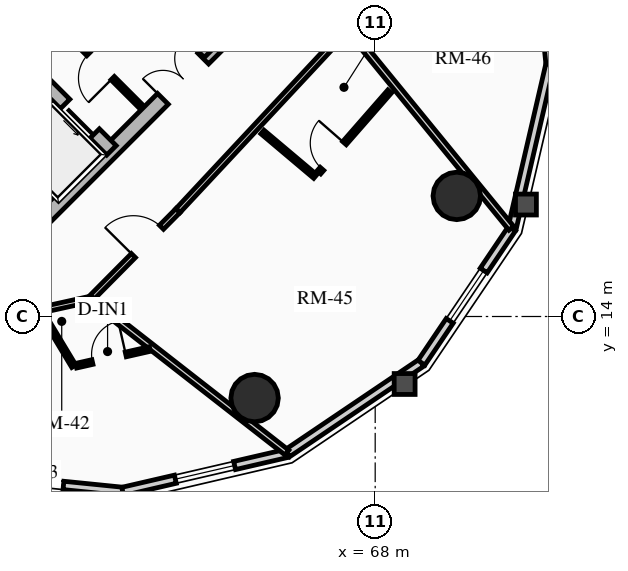
"""IFC4 building model, lengths in metres.
Left out: names, types, materials, properties, quantities, classifications, styles, units other than length and angle.
Written with IfcOpenShell. Run it as: python <this file> out.ifc"""

import sys

from ifc_helpers import new_model, si_unit, direction, frame, frame_2d, origin, origin_2d, place, context, subcontext, project, spatial, rectangle, circle, extrude, source, transform, mapped, element, fill, save


model = new_model("IFC4")
c1 = context("Model", 3, precision=1e-05, world=origin(), true_north=direction((0.0, 1.0)))
c2 = subcontext(c1, "Body", "Model", "MODEL_VIEW")
j1 = project(units=[si_unit("LENGTHUNIT", "METRE"), si_unit("PLANEANGLEUNIT", "RADIAN")], contexts=[c1])
p1 = place(None, origin())
s1 = spatial("IfcSite", under=j1, at=p1, CompositionType="ELEMENT")
p2 = place(p1, origin())
s2 = spatial("IfcBuilding", under=s1, at=p2, CompositionType="ELEMENT")
p3 = place(p2, frame((0.0, 0.0, 183.61)))
s3 = spatial("IfcBuildingStorey", under=s2, at=p3, CompositionType="ELEMENT", Elevation=183.61)
p4 = place(p3, frame((58.561, 15.873, 0.0), z_axis=(0.0, 0.0, 1.0), x_axis=(0.707106781187, 0.707106781187, 0.0)))
e1 = element("IfcWall", 1, at=p4, inside=s3, PredefinedType="SHEAR", context=c2, shape_type="SweptSolid", body=[
    extrude(rectangle(XDim=10.7, YDim=0.4, at=frame_2d((5.35, 0.0))), origin(), (0.0, 0.0, 1.0), 2.91),
])
m1 = source(origin(), c2, "Body", "SweptSolid", [
    extrude(rectangle(XDim=1.5, YDim=2.02, at=frame_2d((0.75, 1.01))), frame((0.0, 0.21, 0.0), z_axis=(0.0, -1.0, 0.0), x_axis=(1.0, 0.0, 0.0)), (0.0, 0.0, 1.0), 0.42),
])
p5 = place(p4, frame((5.45, 0.0, 0.0)))
e2 = element("IfcOpeningElement", 2, at=p5, cuts=e1, PredefinedType="OPENING", context=c2, shape_type="MappedRepresentation", body=[
    mapped(m1, transform((0.0, 0.0, 0.0), x_axis=(1.0, 0.0, 0.0), y_axis=(0.0, 1.0, 0.0), z_axis=(0.0, 0.0, 1.0), scale=1.0)),
])
p6 = place(p3, frame((61.06, 18.373, 0.0), z_axis=(0.0, 0.0, 1.0), x_axis=(-0.707106781187, 0.707106781187, 0.0)))
e3 = element("IfcWall", 3, at=p6, inside=s3, PredefinedType="SHEAR", context=c2, shape_type="SweptSolid", body=[
    extrude(rectangle(XDim=13.7, YDim=0.35, at=frame_2d((6.85, 0.0))), origin(), (0.0, 0.0, 1.0), 2.91),
])
m2 = source(origin(), c2, "Body", "SweptSolid", [
    extrude(rectangle(XDim=1.1, YDim=2.015, at=frame_2d((0.55, 1.007))), frame((0.0, 0.185, 0.0), z_axis=(0.0, -1.0, 0.0), x_axis=(1.0, 0.0, 0.0)), (0.0, 0.0, 1.0), 0.37),
])
p7 = place(p6, frame((4.85, 0.0, 0.0)))
e4 = element("IfcOpeningElement", 4, at=p7, cuts=e3, PredefinedType="OPENING", context=c2, shape_type="MappedRepresentation", body=[
    mapped(m2, transform((0.0, 0.0, 0.0), x_axis=(1.0, 0.0, 0.0), y_axis=(0.0, 1.0, 0.0), z_axis=(0.0, 0.0, 1.0), scale=1.0)),
])
p8 = place(p6, frame((0.625, 0.0, 0.0)))
e5 = element("IfcOpeningElement", 5, at=p8, cuts=e3, PredefinedType="OPENING", context=c2, shape_type="MappedRepresentation", body=[
    mapped(m2, transform((0.0, 0.0, 0.0), x_axis=(1.0, 0.0, 0.0), y_axis=(0.0, 1.0, 0.0), z_axis=(0.0, 0.0, 1.0), scale=1.0)),
])
p9 = place(p6, frame((2.625, 0.0, 0.0)))
e6 = element("IfcOpeningElement", 6, at=p9, cuts=e3, PredefinedType="OPENING", context=c2, shape_type="MappedRepresentation", body=[
    mapped(m2, transform((0.0, 0.0, 0.0), x_axis=(1.0, 0.0, 0.0), y_axis=(0.0, 1.0, 0.0), z_axis=(0.0, 0.0, 1.0), scale=1.0)),
])
m3 = source(origin(), c2, "Body", "SweptSolid", [
    extrude(rectangle(XDim=1.15, YDim=2.02, at=frame_2d((0.575, 1.01))), frame((0.0, 0.185, 0.0), z_axis=(0.0, -1.0, 0.0), x_axis=(1.0, 0.0, 0.0)), (0.0, 0.0, 1.0), 0.37),
])
p10 = place(p6, frame((7.27, 0.0, 0.0)))
e7 = element("IfcOpeningElement", 7, at=p10, cuts=e3, PredefinedType="OPENING", context=c2, shape_type="MappedRepresentation", body=[
    mapped(m3, transform((0.0, 0.0, 0.0), x_axis=(1.0, 0.0, 0.0), y_axis=(0.0, 1.0, 0.0), z_axis=(0.0, 0.0, 1.0), scale=1.0)),
])
p11 = place(p3, frame((63.627, 20.94, 0.0), z_axis=(0.0, 0.0, 1.0), x_axis=(-0.707119496762, 0.707094065383, 0.0)))
e8 = element("IfcWall", 8, at=p11, inside=s3, PredefinedType="SHEAR", context=c2, shape_type="SweptSolid", body=[
    extrude(rectangle(XDim=9.6, YDim=0.35, at=frame_2d((4.8, 0.0))), origin(), (0.0, 0.0, 1.0), 2.91),
])
p12 = place(p11, frame((5.28, 0.0, 0.0)))
e9 = element("IfcOpeningElement", 9, at=p12, cuts=e8, PredefinedType="OPENING", context=c2, shape_type="MappedRepresentation", body=[
    mapped(m3, transform((0.0, 0.0, 0.0), x_axis=(1.0, 0.0, 0.0), y_axis=(0.0, 1.0, 0.0), z_axis=(0.0, 0.0, 1.0), scale=1.0)),
])
for number, where, z_axis, x_axis in (
    (10, (64.827, 11.854, 0.0), (0.0, 0.0, 1.0), (1.0, 0.0, 0.0)),
    (11, (70.146, 17.173, 0.0), (0.0, 0.0, 1.0), (1.0, 0.0, 0.0)),
):
    element("IfcColumn", number, at=place(p3, frame(where, z_axis=z_axis, x_axis=x_axis)), inside=s3, PredefinedType="USERDEFINED", context=c2, shape_type="SweptSolid", body=[
        extrude(circle(Radius=0.625, at=origin_2d()), origin(), (0.0, 0.0, 1.0), 2.91),
    ])
p13 = place(p3, frame((61.355, 9.397, 0.0), z_axis=(0.0, 0.0, 1.0), x_axis=(-0.994943283129, 0.100438356004, 0.0)))
e12 = element("IfcWall", 12, at=p13, inside=s3, PredefinedType="SOLIDWALL", context=c2, shape_type="SweptSolid", body=[
    extrude(rectangle(XDim=4.733, YDim=0.22, at=frame_2d((2.366, 0.0))), origin(), (0.0, 0.0, 1.0), 2.245),
])
m4 = source(origin(), c2, "Body", "SweptSolid", [
    extrude(rectangle(XDim=1.6, YDim=1.3, at=frame_2d((0.8, 0.65))), frame((0.0, 0.12, 0.0), z_axis=(0.0, -1.0, 0.0), x_axis=(1.0, 0.0, 0.0)), (0.0, 0.0, 1.0), 0.24),
])
p14 = place(p13, frame((1.566, 0.0, 0.65)))
e13 = element("IfcOpeningElement", 13, at=p14, cuts=e12, PredefinedType="OPENING", context=c2, shape_type="MappedRepresentation", body=[
    mapped(m4, transform((0.0, 0.0, 0.0), x_axis=(1.0, 0.0, 0.0), y_axis=(0.0, 1.0, 0.0), z_axis=(0.0, 0.0, 1.0), scale=1.0)),
])
p15 = place(p3, frame((65.687, 10.4, 0.0), z_axis=(0.0, 0.0, 1.0), x_axis=(-0.97422620202, -0.22557328587, 0.0)))
e14 = element("IfcWall", 14, at=p15, inside=s3, PredefinedType="SOLIDWALL", context=c2, shape_type="SweptSolid", body=[
    extrude(rectangle(XDim=4.446, YDim=0.22, at=frame_2d((2.223, 0.0))), origin(), (0.0, 0.0, 1.0), 2.245),
])
p16 = place(p15, frame((1.423, 0.0, 0.65)))
e15 = element("IfcOpeningElement", 15, at=p16, cuts=e14, PredefinedType="OPENING", context=c2, shape_type="MappedRepresentation", body=[
    mapped(m4, transform((0.0, 0.0, 0.0), x_axis=(1.0, 0.0, 0.0), y_axis=(0.0, 1.0, 0.0), z_axis=(0.0, 0.0, 1.0), scale=1.0)),
])
p17 = place(p3, frame((69.217, 12.783, 0.0), z_axis=(0.0, 0.0, 1.0), x_axis=(-0.828817439852, -0.55951912514, 0.0)))
e16 = element("IfcWall", 16, at=p17, inside=s3, PredefinedType="SOLIDWALL", context=c2, shape_type="SweptSolid", body=[
    extrude(rectangle(XDim=4.259, YDim=0.22, at=frame_2d((2.129, 0.0))), origin(), (0.0, 0.0, 1.0), 2.245),
])
p18 = place(p3, frame((71.6, 16.313, 0.0), z_axis=(0.0, 0.0, 1.0), x_axis=(-0.55951912514, -0.828817439852, 0.0)))
e17 = element("IfcWall", 17, at=p18, inside=s3, PredefinedType="SOLIDWALL", context=c2, shape_type="SweptSolid", body=[
    extrude(rectangle(XDim=4.259, YDim=0.22, at=frame_2d((2.129, 0.0))), origin(), (0.0, 0.0, 1.0), 2.245),
])
p19 = place(p18, frame((1.33, 0.0, 0.65)))
e18 = element("IfcOpeningElement", 18, at=p19, cuts=e17, PredefinedType="OPENING", context=c2, shape_type="MappedRepresentation", body=[
    mapped(m4, transform((0.0, 0.0, 0.0), x_axis=(1.0, 0.0, 0.0), y_axis=(0.0, 1.0, 0.0), z_axis=(0.0, 0.0, 1.0), scale=1.0)),
])
p20 = place(p3, frame((72.603, 20.645, 0.0), z_axis=(0.0, 0.0, 1.0), x_axis=(-0.22557328587, -0.97422620202, 0.0)))
e19 = element("IfcWall", 19, at=p20, inside=s3, PredefinedType="SOLIDWALL", context=c2, shape_type="SweptSolid", body=[
    extrude(rectangle(XDim=4.446, YDim=0.22, at=frame_2d((2.223, 0.0))), origin(), (0.0, 0.0, 1.0), 2.245),
])
p21 = place(p3, frame((72.127, 25.354, 0.0), z_axis=(0.0, 0.0, 1.0), x_axis=(0.100438356004, -0.994943283129, 0.0)))
e20 = element("IfcWall", 20, at=p21, inside=s3, PredefinedType="SOLIDWALL", context=c2, shape_type="SweptSolid", body=[
    extrude(rectangle(XDim=4.733, YDim=0.22, at=frame_2d((2.366, 0.0))), origin(), (0.0, 0.0, 1.0), 2.245),
])
p22 = place(p21, frame((1.566, 0.0, 0.65)))
e21 = element("IfcOpeningElement", 21, at=p22, cuts=e20, PredefinedType="OPENING", context=c2, shape_type="MappedRepresentation", body=[
    mapped(m4, transform((0.0, 0.0, 0.0), x_axis=(1.0, 0.0, 0.0), y_axis=(0.0, 1.0, 0.0), z_axis=(0.0, 0.0, 1.0), scale=1.0)),
])
p23 = place(p3, frame((61.835, 19.529, 0.0), z_axis=(0.0, 0.0, 1.0), x_axis=(-0.707146413884, 0.707067146267, 0.0)))
e22 = element("IfcWall", 22, at=p23, inside=s3, PredefinedType="PARTITIONING", context=c2, shape_type="SweptSolid", body=[
    extrude(rectangle(XDim=3.08, YDim=0.125, at=frame_2d((1.54, 0.0))), origin(), (0.0, 0.0, 1.0), 2.675),
])
m5 = source(origin(), c2, "Body", "SweptSolid", [
    extrude(rectangle(XDim=0.9, YDim=2.005, at=frame_2d((0.45, 1.002))), frame((0.0, 0.073, 0.0), z_axis=(0.0, -1.0, 0.0), x_axis=(1.0, 0.0, 0.0)), (0.0, 0.0, 1.0), 0.145),
])
p24 = place(p23, frame((1.05, 0.0, 0.0)))
e23 = element("IfcOpeningElement", 23, at=p24, cuts=e22, PredefinedType="OPENING", context=c2, shape_type="MappedRepresentation", body=[
    mapped(m5, transform((0.0, 0.0, 0.0), x_axis=(1.0, 0.0, 0.0), y_axis=(0.0, 1.0, 0.0), z_axis=(0.0, 0.0, 1.0), scale=1.0)),
])
p25 = place(p3, frame((58.794, 20.915, 0.0), z_axis=(0.0, 0.0, 1.0), x_axis=(0.707106781187, 0.707106781187, 0.0)))
e24 = element("IfcWall", 24, at=p25, inside=s3, PredefinedType="PARTITIONING", context=c2, shape_type="SweptSolid", body=[
    extrude(rectangle(XDim=1.1, YDim=0.125, at=frame_2d((0.55, 0.0))), origin(), (0.0, 0.0, 1.0), 2.675),
])
p26 = place(p3, frame((58.967, 14.118, 0.0), z_axis=(0.0, 0.0, 1.0), x_axis=(0.976471358036, 0.215647135235, 0.0)))
e25 = element("IfcWall", 25, at=p26, inside=s3, PredefinedType="PARTITIONING", context=c2, shape_type="SweptSolid", body=[
    extrude(rectangle(XDim=1.571, YDim=0.15, at=frame_2d((0.786, 0.0))), origin(), (0.0, 0.0, 1.0), 2.245),
])
p27 = place(p3, frame((60.501, 14.457, 0.0), z_axis=(0.0, 0.0, 1.0), x_axis=(0.704012266258, 0.710187812454, 0.0)))
e26 = element("IfcWall", 26, at=p27, inside=s3, PredefinedType="PARTITIONING", context=c2, shape_type="SweptSolid", body=[
    extrude(rectangle(XDim=3.281, YDim=0.15, at=frame_2d((1.641, 0.0))), origin(), (0.0, 0.0, 1.0), 2.245),
])
m6 = source(origin(), c2, "Body", "SweptSolid", [
    extrude(rectangle(XDim=1.05, YDim=2.015, at=frame_2d((0.525, 1.007))), frame((0.0, 0.085, 0.0), z_axis=(0.0, -1.0, 0.0), x_axis=(1.0, 0.0, 0.0)), (0.0, 0.0, 1.0), 0.17),
])
p28 = place(p27, frame((1.614, 0.0, 0.0)))
e27 = element("IfcOpeningElement", 27, at=p28, cuts=e26, PredefinedType="OPENING", context=c2, shape_type="MappedRepresentation", body=[
    mapped(m6, transform((0.0, 0.0, 0.0), x_axis=(1.0, 0.0, 0.0), y_axis=(0.0, 1.0, 0.0), z_axis=(0.0, 0.0, 1.0), scale=1.0)),
])
p29 = place(p3, frame((62.812, 16.788, 0.0), z_axis=(0.0, 0.0, 1.0), x_axis=(0.682323555485, 0.731050316757, 0.0)))
e28 = element("IfcWall", 28, at=p29, inside=s3, PredefinedType="PARTITIONING", context=c2, shape_type="SweptSolid", body=[
    extrude(rectangle(XDim=6.559, YDim=0.15, at=frame_2d((3.279, 0.0))), origin(), (0.0, 0.0, 1.0), 2.245),
])
p30 = place(p3, frame((60.501, 14.457, 0.0), z_axis=(0.0, 0.0, 1.0), x_axis=(0.788354052705, -0.61522181982, 0.0)))
e29 = element("IfcWall", 29, at=p30, inside=s3, PredefinedType="PARTITIONING", context=c2, shape_type="SweptSolid", body=[
    extrude(rectangle(XDim=6.566, YDim=0.16, at=frame_2d((3.283, 0.0))), origin(), (0.0, 0.0, 1.0), 2.245),
])
p31 = place(p3, frame((67.287, 21.582, 0.0), z_axis=(0.0, 0.0, 1.0), x_axis=(0.632528819581, -0.774536824431, 0.0)))
e30 = element("IfcWall", 30, at=p31, inside=s3, PredefinedType="PARTITIONING", context=c2, shape_type="SweptSolid", body=[
    extrude(rectangle(XDim=6.791, YDim=0.16, at=frame_2d((3.396, 0.0))), origin(), (0.0, 0.0, 1.0), 2.245),
])
p32 = place(p3, frame((59.265, 14.028, 0.0), z_axis=(0.0, 0.0, 1.0), x_axis=(0.515875690436, -0.856663453181, 0.0)))
e31 = element("IfcWall", 31, at=p32, inside=s3, PredefinedType="PARTITIONING", context=c2, shape_type="SweptSolid", body=[
    extrude(rectangle(XDim=1.56, YDim=0.125, at=frame_2d((0.78, 0.0))), origin(), (0.0, 0.0, 1.0), 2.245),
])
p33 = place(p3, frame((60.131, 12.705, 0.0), z_axis=(0.0, 0.0, 1.0), x_axis=(0.975184609806, 0.221393262767, 0.0)))
e32 = element("IfcWall", 32, at=p33, inside=s3, PredefinedType="PARTITIONING", context=c2, shape_type="SweptSolid", body=[
    extrude(rectangle(XDim=1.991, YDim=0.125, at=frame_2d((0.996, 0.0))), origin(), (0.0, 0.0, 1.0), 2.675),
])
p34 = place(p33, frame((0.439, 0.0, 0.0)))
e33 = element("IfcOpeningElement", 33, at=p34, cuts=e32, PredefinedType="OPENING", context=c2, shape_type="MappedRepresentation", body=[
    mapped(m5, transform((0.0, 0.0, 0.0), x_axis=(1.0, 0.0, 0.0), y_axis=(0.0, 1.0, 0.0), z_axis=(0.0, 0.0, 1.0), scale=1.0)),
])
p35 = place(p3, frame((65.033, 18.856, 0.0), z_axis=(0.0, 0.0, 1.0), x_axis=(0.764632588969, -0.644466449, 0.0)))
e34 = element("IfcWall", 34, at=p35, inside=s3, PredefinedType="PARTITIONING", context=c2, shape_type="SweptSolid", body=[
    extrude(rectangle(XDim=1.818, YDim=0.125, at=frame_2d((0.909, 0.0))), origin(), (0.0, 0.0, 1.0), 2.675),
])
p36 = place(p3, frame((66.52, 17.795, 0.0), z_axis=(0.0, 0.0, 1.0), x_axis=(0.658266024679, 0.752785388244, 0.0)))
e35 = element("IfcWall", 35, at=p36, inside=s3, PredefinedType="PARTITIONING", context=c2, shape_type="SweptSolid", body=[
    extrude(rectangle(XDim=2.826, YDim=0.125, at=frame_2d((1.413, 0.0))), origin(), (0.0, 0.0, 1.0), 2.245),
])
p37 = place(p36, frame((0.12, 0.0, 0.0)))
e36 = element("IfcOpeningElement", 36, at=p37, cuts=e35, PredefinedType="OPENING", context=c2, shape_type="MappedRepresentation", body=[
    mapped(m5, transform((0.0, 0.0, 0.0), x_axis=(1.0, 0.0, 0.0), y_axis=(0.0, 1.0, 0.0), z_axis=(0.0, 0.0, 1.0), scale=1.0)),
])
m7 = source(origin(), c2, "Body", "SweptSolid", [
    extrude(rectangle(XDim=1.6, YDim=1.3, at=frame_2d((0.8, 0.65))), frame((0.0, 0.03, 0.0), z_axis=(0.0, -1.0, 0.0), x_axis=(1.0, 0.0, 0.0)), (0.0, 0.0, 1.0), 0.06),
])
p38 = place(p14, origin())
e37 = element("IfcWindow", 37, at=p38, inside=s3, PartitioningType="SINGLE_PANEL", PredefinedType="WINDOW", context=c2, shape_type="MappedRepresentation", body=[
    mapped(m7, transform((0.0, 0.0, 0.0), x_axis=(1.0, 0.0, 0.0), y_axis=(0.0, 1.0, 0.0), z_axis=(0.0, 0.0, 1.0), scale=1.0)),
])
fill(e13, e37)
p39 = place(p16, origin())
e38 = element("IfcWindow", 38, at=p39, inside=s3, PartitioningType="SINGLE_PANEL", PredefinedType="WINDOW", context=c2, shape_type="MappedRepresentation", body=[
    mapped(m7, transform((0.0, 0.0, 0.0), x_axis=(1.0, 0.0, 0.0), y_axis=(0.0, 1.0, 0.0), z_axis=(0.0, 0.0, 1.0), scale=1.0)),
])
fill(e15, e38)
p40 = place(p19, origin())
e39 = element("IfcWindow", 39, at=p40, inside=s3, PartitioningType="SINGLE_PANEL", PredefinedType="WINDOW", context=c2, shape_type="MappedRepresentation", body=[
    mapped(m7, transform((0.0, 0.0, 0.0), x_axis=(1.0, 0.0, 0.0), y_axis=(0.0, 1.0, 0.0), z_axis=(0.0, 0.0, 1.0), scale=1.0)),
])
fill(e18, e39)
m8 = source(origin(), c2, "Body", "SweptSolid", [
    extrude(rectangle(XDim=1.1, YDim=2.015, at=frame_2d((0.55, 1.007))), frame((0.0, 0.025, 0.0), z_axis=(0.0, -1.0, 0.0), x_axis=(1.0, 0.0, 0.0)), (0.0, 0.0, 1.0), 0.05),
])
p41 = place(p8, origin())
e40 = element("IfcDoor", 40, at=p41, inside=s3, OperationType="SLIDING_TO_LEFT", PredefinedType="DOOR", context=c2, shape_type="MappedRepresentation", body=[
    mapped(m8, transform((0.0, 0.0, 0.0), x_axis=(1.0, 0.0, 0.0), y_axis=(0.0, 1.0, 0.0), z_axis=(0.0, 0.0, 1.0), scale=1.0)),
])
fill(e5, e40)
m9 = source(origin(), c2, "Body", "SweptSolid", [
    extrude(rectangle(XDim=1.5, YDim=2.02, at=frame_2d((0.75, 1.01))), frame((0.0, 0.025, 0.0), z_axis=(0.0, -1.0, 0.0), x_axis=(1.0, 0.0, 0.0)), (0.0, 0.0, 1.0), 0.05),
])
p42 = place(p5, origin())
e41 = element("IfcDoor", 41, at=p42, inside=s3, OperationType="DOUBLE_DOOR_SINGLE_SWING", PredefinedType="DOOR", context=c2, shape_type="MappedRepresentation", body=[
    mapped(m9, transform((0.0, 0.0, 0.0), x_axis=(1.0, 0.0, 0.0), y_axis=(0.0, 1.0, 0.0), z_axis=(0.0, 0.0, 1.0), scale=1.0)),
])
fill(e2, e41)
m10 = source(origin(), c2, "Body", "SweptSolid", [
    extrude(rectangle(XDim=0.9, YDim=2.005, at=frame_2d((0.45, 1.002))), frame((0.0, 0.025, 0.0), z_axis=(0.0, -1.0, 0.0), x_axis=(1.0, 0.0, 0.0)), (0.0, 0.0, 1.0), 0.05),
])
p43 = place(p24, origin())
e42 = element("IfcDoor", 42, at=p43, inside=s3, OperationType="SINGLE_SWING_LEFT", PredefinedType="DOOR", context=c2, shape_type="MappedRepresentation", body=[
    mapped(m10, transform((0.0, 0.0, 0.0), x_axis=(1.0, 0.0, 0.0), y_axis=(0.0, 1.0, 0.0), z_axis=(0.0, 0.0, 1.0), scale=1.0)),
])
fill(e23, e42)
p44 = place(p34, origin())
e43 = element("IfcDoor", 43, at=p44, inside=s3, OperationType="SINGLE_SWING_RIGHT", PredefinedType="DOOR", context=c2, shape_type="MappedRepresentation", body=[
    mapped(m10, transform((0.0, 0.0, 0.0), x_axis=(1.0, 0.0, 0.0), y_axis=(0.0, 1.0, 0.0), z_axis=(0.0, 0.0, 1.0), scale=1.0)),
])
fill(e33, e43)
m11 = source(origin(), c2, "Body", "SweptSolid", [
    extrude(rectangle(XDim=1.05, YDim=2.015, at=frame_2d((0.525, 1.007))), frame((0.0, 0.025, 0.0), z_axis=(0.0, -1.0, 0.0), x_axis=(1.0, 0.0, 0.0)), (0.0, 0.0, 1.0), 0.05),
])
p45 = place(p28, origin())
e44 = element("IfcDoor", 44, at=p45, inside=s3, OperationType="SINGLE_SWING_LEFT", PredefinedType="DOOR", context=c2, shape_type="MappedRepresentation", body=[
    mapped(m11, transform((0.0, 0.0, 0.0), x_axis=(1.0, 0.0, 0.0), y_axis=(0.0, 1.0, 0.0), z_axis=(0.0, 0.0, 1.0), scale=1.0)),
])
fill(e27, e44)
p46 = place(p37, origin())
e45 = element("IfcDoor", 45, at=p46, inside=s3, OperationType="SINGLE_SWING_RIGHT", PredefinedType="DOOR", context=c2, shape_type="MappedRepresentation", body=[
    mapped(m10, transform((0.0, 0.0, 0.0), x_axis=(1.0, 0.0, 0.0), y_axis=(0.0, 1.0, 0.0), z_axis=(0.0, 0.0, 1.0), scale=1.0)),
])
fill(e36, e45)
save(model, sys.argv[1])
